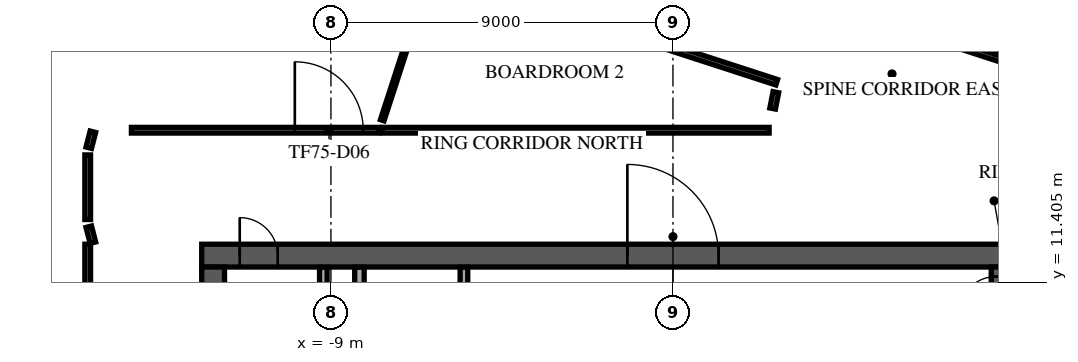
"""IFC4 building model, lengths in metres.
Left out: names, types, materials, properties, quantities, classifications, styles, units other than length and angle.
Written with IfcOpenShell. Run it as: python <this file> out.ifc"""

import sys

from ifc_helpers import new_model, si_unit, direction, frame, frame_2d, origin, place, context, subcontext, project, spatial, rectangle, extrude, element, fill, save


model = new_model("IFC4")
c1 = context("Model", 3, precision=1e-05, world=origin(), true_north=direction((0.0, 1.0)))
c2 = subcontext(c1, "Body", "Model", "MODEL_VIEW")
j1 = project(units=[si_unit("LENGTHUNIT", "METRE"), si_unit("PLANEANGLEUNIT", "RADIAN")], contexts=[c1])
p1 = place(None, origin())
s1 = spatial("IfcSite", under=j1, at=p1, CompositionType="ELEMENT")
p2 = place(p1, origin())
s2 = spatial("IfcBuilding", under=s1, at=p2, CompositionType="ELEMENT")
p3 = place(p2, frame((0.0, 0.0, 316.5)))
s3 = spatial("IfcBuildingStorey", under=s2, at=p3, CompositionType="ELEMENT", Elevation=316.5)
p4 = place(p3, frame((-12.4, 12.1, 0.0), z_axis=(0.0, 0.0, 1.0), x_axis=(1.0, 0.0, 0.0)))
e1 = element("IfcWall", 1, at=p4, inside=s3, PredefinedType="SHEAR", context=c2, shape_type="SweptSolid", body=[
    extrude(rectangle(XDim=24.8, YDim=0.6, at=frame_2d((12.4, 0.0))), origin(), (0.0, 0.0, 1.0), 3.65),
])
p5 = place(p4, frame((11.2, 0.0, 0.0)))
e2 = element("IfcOpeningElement", 2, at=p5, cuts=e1, PredefinedType="OPENING", context=c2, shape_type="SweptSolid", body=[
    extrude(rectangle(XDim=2.4, YDim=2.4, at=frame_2d((1.2, 1.2))), frame((0.0, 0.31, 0.0), z_axis=(0.0, -1.0, 0.0), x_axis=(1.0, 0.0, 0.0)), (0.0, 0.0, 1.0), 0.62),
])
p6 = place(p4, frame((22.025, 0.0, 0.0)))
e3 = element("IfcOpeningElement", 3, at=p6, cuts=e1, PredefinedType="OPENING", context=c2, shape_type="SweptSolid", body=[
    extrude(rectangle(XDim=1.2, YDim=2.1, at=frame_2d((0.6, 1.05))), frame((0.0, 0.31, 0.0), z_axis=(0.0, -1.0, 0.0), x_axis=(1.0, 0.0, 0.0)), (0.0, 0.0, 1.0), 0.62),
])
p7 = place(p4, frame((1.0, 0.0, 0.0)))
e4 = element("IfcOpeningElement", 4, at=p7, cuts=e1, PredefinedType="OPENING", context=c2, shape_type="SweptSolid", body=[
    extrude(rectangle(XDim=1.0, YDim=2.1, at=frame_2d((0.5, 1.05))), frame((0.0, 0.31, 0.0), z_axis=(0.0, -1.0, 0.0), x_axis=(1.0, 0.0, 0.0)), (0.0, 0.0, 1.0), 0.62),
])
p8 = place(p3, frame((-12.1, -11.8, 0.0), z_axis=(0.0, 0.0, 1.0), x_axis=(0.0, 1.0, 0.0)))
e5 = element("IfcWall", 5, at=p8, inside=s3, PredefinedType="SHEAR", context=c2, shape_type="SweptSolid", body=[
    extrude(rectangle(XDim=23.6, YDim=0.6, at=frame_2d((11.8, 0.0))), origin(), (0.0, 0.0, 1.0), 3.65),
])
p9 = place(p8, frame((10.6, 0.0, 0.0)))
e6 = element("IfcOpeningElement", 6, at=p9, cuts=e5, PredefinedType="OPENING", context=c2, shape_type="SweptSolid", body=[
    extrude(rectangle(XDim=2.4, YDim=2.4, at=frame_2d((1.2, 1.2))), frame((0.0, 0.31, 0.0), z_axis=(0.0, -1.0, 0.0), x_axis=(1.0, 0.0, 0.0)), (0.0, 0.0, 1.0), 0.62),
])
p10 = place(p3, frame((8.512, 4.55, 0.0), z_axis=(0.0, 0.0, 1.0), x_axis=(0.0, 1.0, 0.0)))
e7 = element("IfcWall", 7, at=p10, inside=s3, PredefinedType="SOLIDWALL", context=c2, shape_type="SweptSolid", body=[
    extrude(rectangle(XDim=7.25, YDim=0.275, at=frame_2d((3.625, 0.0))), origin(), (0.0, 0.0, 1.0), 3.65),
])
p11 = place(p10, frame((6.0, 0.0, 0.0)))
e8 = element("IfcOpeningElement", 8, at=p11, cuts=e7, PredefinedType="OPENING", context=c2, shape_type="SweptSolid", body=[
    extrude(rectangle(XDim=1.0, YDim=2.1, at=frame_2d((0.5, 1.05))), frame((0.0, 0.147, 0.0), z_axis=(0.0, -1.0, 0.0), x_axis=(1.0, 0.0, 0.0)), (0.0, 0.0, 1.0), 0.295),
])
p12 = place(p3, frame((-9.2, 4.78, 0.0), z_axis=(0.0, 0.0, 1.0), x_axis=(0.0, 1.0, 0.0)))
e9 = element("IfcWall", 9, at=p12, inside=s3, PredefinedType="PARTITIONING", context=c2, shape_type="SweptSolid", body=[
    extrude(rectangle(XDim=7.015, YDim=0.2, at=frame_2d((3.507, 0.0))), origin(), (0.0, 0.0, 1.0), 3.65),
])
p13 = place(p12, frame((2.92, 0.0, 0.0)))
e10 = element("IfcOpeningElement", 10, at=p13, cuts=e9, PredefinedType="OPENING", context=c2, shape_type="SweptSolid", body=[
    extrude(rectangle(XDim=1.0, YDim=2.1, at=frame_2d((0.5, 1.05))), frame((0.0, 0.11, 0.0), z_axis=(0.0, -1.0, 0.0), x_axis=(1.0, 0.0, 0.0)), (0.0, 0.0, 1.0), 0.22),
])
p14 = place(p3, frame((-8.25, 8.805, 0.0), z_axis=(0.0, 0.0, 1.0), x_axis=(0.0, 1.0, 0.0)))
e11 = element("IfcWall", 11, at=p14, inside=s3, PredefinedType="PARTITIONING", context=c2, shape_type="SweptSolid", body=[
    extrude(rectangle(XDim=2.99, YDim=0.25, at=frame_2d((1.495, 0.0))), origin(), (0.0, 0.0, 1.0), 3.65),
])
p15 = place(p14, frame((0.895, 0.0, 0.0)))
e12 = element("IfcOpeningElement", 12, at=p15, cuts=e11, PredefinedType="OPENING", context=c2, shape_type="SweptSolid", body=[
    extrude(rectangle(XDim=1.0, YDim=2.1, at=frame_2d((0.5, 1.05))), frame((0.0, 0.135, 0.0), z_axis=(0.0, -1.0, 0.0), x_axis=(1.0, 0.0, 0.0)), (0.0, 0.0, 1.0), 0.27),
])
p16 = place(p3, frame((-5.5, 8.805, 0.0), z_axis=(0.0, 0.0, 1.0), x_axis=(0.0, 1.0, 0.0)))
e13 = element("IfcWall", 13, at=p16, inside=s3, PredefinedType="PARTITIONING", context=c2, shape_type="SweptSolid", body=[
    extrude(rectangle(XDim=2.99, YDim=0.2, at=frame_2d((1.495, 0.0))), origin(), (0.0, 0.0, 1.0), 3.65),
])
p17 = place(p16, frame((0.532, 0.0, 0.0)))
e14 = element("IfcOpeningElement", 14, at=p17, cuts=e13, PredefinedType="OPENING", context=c2, shape_type="SweptSolid", body=[
    extrude(rectangle(XDim=1.8, YDim=2.1, at=frame_2d((0.9, 1.05))), frame((0.0, 0.11, 0.0), z_axis=(0.0, -1.0, 0.0), x_axis=(1.0, 0.0, 0.0)), (0.0, 0.0, 1.0), 0.22),
])
p18 = place(p3, frame((-15.4, -12.4, 0.0), z_axis=(0.0, 0.0, 1.0), x_axis=(0.0, 1.0, 0.0)))
e15 = element("IfcWall", 15, at=p18, inside=s3, PredefinedType="PARTITIONING", context=c2, shape_type="SweptSolid", body=[
    extrude(rectangle(XDim=24.8, YDim=0.15, at=frame_2d((12.4, 0.0))), origin(), (0.0, 0.0, 1.0), 3.25),
])
p19 = place(p18, frame((1.05, 0.0, 0.0)))
e16 = element("IfcOpeningElement", 16, at=p19, cuts=e15, PredefinedType="OPENING", context=c2, shape_type="SweptSolid", body=[
    extrude(rectangle(XDim=1.0, YDim=2.1, at=frame_2d((0.5, 1.05))), frame((0.0, 0.085, 0.0), z_axis=(0.0, -1.0, 0.0), x_axis=(1.0, 0.0, 0.0)), (0.0, 0.0, 1.0), 0.17),
])
p20 = place(p18, frame((9.767, 0.0, 0.0)))
e17 = element("IfcOpeningElement", 17, at=p20, cuts=e15, PredefinedType="OPENING", context=c2, shape_type="SweptSolid", body=[
    extrude(rectangle(XDim=1.0, YDim=2.1, at=frame_2d((0.5, 1.05))), frame((0.0, 0.085, 0.0), z_axis=(0.0, -1.0, 0.0), x_axis=(1.0, 0.0, 0.0)), (0.0, 0.0, 1.0), 0.17),
])
p21 = place(p18, frame((16.733, 0.0, 0.0)))
e18 = element("IfcOpeningElement", 18, at=p21, cuts=e15, PredefinedType="OPENING", context=c2, shape_type="SweptSolid", body=[
    extrude(rectangle(XDim=1.0, YDim=2.1, at=frame_2d((0.5, 1.05))), frame((0.0, 0.085, 0.0), z_axis=(0.0, -1.0, 0.0), x_axis=(1.0, 0.0, 0.0)), (0.0, 0.0, 1.0), 0.17),
])
p22 = place(p3, frame((-15.4, 13.05, 0.0), z_axis=(0.0, 0.0, 1.0), x_axis=(0.0, 1.0, 0.0)))
e19 = element("IfcWall", 19, at=p22, inside=s3, PredefinedType="PARTITIONING", context=c2, shape_type="SweptSolid", body=[
    extrude(rectangle(XDim=1.7, YDim=0.15, at=frame_2d((0.85, 0.0))), origin(), (0.0, 0.0, 1.0), 3.25),
])
p23 = place(p3, frame((-15.263, 12.44, 0.0), z_axis=(0.0, 0.0, 1.0), x_axis=(-0.249928977064, 0.968264171817, 0.0)))
e20 = element("IfcWall", 20, at=p23, inside=s3, PredefinedType="PARTITIONING", context=c2, shape_type="SweptSolid", body=[
    extrude(rectangle(XDim=0.435, YDim=0.15, at=frame_2d((0.217, 0.0))), origin(), (0.0, 0.0, 1.0), 3.25),
])
p24 = place(p3, frame((-15.263, 15.36, 0.0), z_axis=(0.0, 0.0, 1.0), x_axis=(-0.250064963452, -0.968229060736, 0.0)))
e21 = element("IfcWall", 21, at=p24, inside=s3, PredefinedType="PARTITIONING", context=c2, shape_type="SweptSolid", body=[
    extrude(rectangle(XDim=0.435, YDim=0.15, at=frame_2d((0.217, 0.0))), origin(), (0.0, 0.0, 1.0), 3.25),
])
p25 = place(p3, frame((-14.25, 15.4, 0.0), z_axis=(0.0, 0.0, 1.0), x_axis=(1.0, 0.0, 0.0)))
e22 = element("IfcWall", 22, at=p25, inside=s3, PredefinedType="PARTITIONING", context=c2, shape_type="SweptSolid", body=[
    extrude(rectangle(XDim=6.515, YDim=0.15, at=frame_2d((3.258, 0.0))), origin(), (0.0, 0.0, 1.0), 3.25),
])
p26 = place(p25, frame((4.3, 0.0, 0.0)))
e23 = element("IfcOpeningElement", 23, at=p26, cuts=e22, PredefinedType="OPENING", context=c2, shape_type="SweptSolid", body=[
    extrude(rectangle(XDim=1.8, YDim=2.1, at=frame_2d((0.9, 1.05))), frame((0.0, 0.085, 0.0), z_axis=(0.0, -1.0, 0.0), x_axis=(1.0, 0.0, 0.0)), (0.0, 0.0, 1.0), 0.17),
])
p27 = place(p3, frame((-11.706, 21.352, 0.0), z_axis=(0.0, 0.0, 1.0), x_axis=(0.951071532065, -0.308970776767, 0.0)))
e24 = element("IfcWall", 24, at=p27, inside=s3, PredefinedType="PARTITIONING", context=c2, shape_type="SweptSolid", body=[
    extrude(rectangle(XDim=15.178, YDim=0.15, at=frame_2d((7.589, 0.0))), origin(), (0.0, 0.0, 1.0), 3.25),
])
p28 = place(p27, frame((3.55, 0.0, 0.0)))
e25 = element("IfcOpeningElement", 25, at=p28, cuts=e24, PredefinedType="OPENING", context=c2, shape_type="SweptSolid", body=[
    extrude(rectangle(XDim=1.0, YDim=2.1, at=frame_2d((0.5, 1.05))), frame((0.0, 0.085, 0.0), z_axis=(0.0, -1.0, 0.0), x_axis=(1.0, 0.0, 0.0)), (0.0, 0.0, 1.0), 0.17),
])
p29 = place(p27, frame((7.665, 0.0, 0.0)))
e26 = element("IfcOpeningElement", 26, at=p29, cuts=e24, PredefinedType="OPENING", context=c2, shape_type="SweptSolid", body=[
    extrude(rectangle(XDim=1.0, YDim=2.1, at=frame_2d((0.5, 1.05))), frame((0.0, 0.085, 0.0), z_axis=(0.0, -1.0, 0.0), x_axis=(1.0, 0.0, 0.0)), (0.0, 0.0, 1.0), 0.17),
])
p30 = place(p3, frame((-10.964, 23.635, 0.0), z_axis=(0.0, 0.0, 1.0), x_axis=(0.951055018443, -0.309021604252, 0.0)))
e27 = element("IfcWall", 27, at=p30, inside=s3, PredefinedType="PARTITIONING", context=c2, shape_type="SweptSolid", body=[
    extrude(rectangle(XDim=35.537, YDim=0.15, at=frame_2d((17.769, 0.0))), origin(), (0.0, 0.0, 1.0), 3.25),
])
p31 = place(p30, frame((9.554, 0.0, 0.0)))
e28 = element("IfcOpeningElement", 28, at=p31, cuts=e27, PredefinedType="OPENING", context=c2, shape_type="SweptSolid", body=[
    extrude(rectangle(XDim=1.0, YDim=2.1, at=frame_2d((0.5, 1.05))), frame((0.0, 0.085, 0.0), z_axis=(0.0, -1.0, 0.0), x_axis=(1.0, 0.0, 0.0)), (0.0, 0.0, 1.0), 0.17),
])
p32 = place(p30, frame((14.629, 0.0, 0.0)))
e29 = element("IfcOpeningElement", 29, at=p32, cuts=e27, PredefinedType="OPENING", context=c2, shape_type="SweptSolid", body=[
    extrude(rectangle(XDim=1.0, YDim=2.1, at=frame_2d((0.5, 1.05))), frame((0.0, 0.085, 0.0), z_axis=(0.0, -1.0, 0.0), x_axis=(1.0, 0.0, 0.0)), (0.0, 0.0, 1.0), 0.17),
])
p33 = place(p30, frame((27.287, 0.0, 0.0)))
e30 = element("IfcOpeningElement", 30, at=p33, cuts=e27, PredefinedType="OPENING", context=c2, shape_type="SweptSolid", body=[
    extrude(rectangle(XDim=1.0, YDim=2.1, at=frame_2d((0.5, 1.05))), frame((0.0, 0.085, 0.0), z_axis=(0.0, -1.0, 0.0), x_axis=(1.0, 0.0, 0.0)), (0.0, 0.0, 1.0), 0.17),
])
p34 = place(p30, frame((29.988, 0.0, 0.0)))
e31 = element("IfcOpeningElement", 31, at=p34, cuts=e27, PredefinedType="OPENING", context=c2, shape_type="SweptSolid", body=[
    extrude(rectangle(XDim=1.8, YDim=2.1, at=frame_2d((0.9, 1.05))), frame((0.0, 0.085, 0.0), z_axis=(0.0, -1.0, 0.0), x_axis=(1.0, 0.0, 0.0)), (0.0, 0.0, 1.0), 0.17),
])
p35 = place(p3, frame((-7.65, 15.4, 0.0), z_axis=(0.0, 0.0, 1.0), x_axis=(1.0, 0.0, 0.0)))
e32 = element("IfcWall", 32, at=p35, inside=s3, PredefinedType="PARTITIONING", context=c2, shape_type="SweptSolid", body=[
    extrude(rectangle(XDim=10.18, YDim=0.15, at=frame_2d((5.09, 0.0))), origin(), (0.0, 0.0, 1.0), 3.25),
])
p36 = place(p3, frame((2.708, 16.4, 0.0), z_axis=(0.0, 0.0, 1.0), x_axis=(-0.193004252624, -0.981197920131, 0.0)))
e33 = element("IfcWall", 33, at=p36, inside=s3, PredefinedType="PARTITIONING", context=c2, shape_type="SweptSolid", body=[
    extrude(rectangle(XDim=0.438, YDim=0.15, at=frame_2d((0.219, 0.0))), origin(), (0.0, 0.0, 1.0), 3.25),
])
p37 = place(p3, frame((-7.65, 15.662, 0.0), z_axis=(0.0, 0.0, 1.0), x_axis=(0.308990083735, 0.951065259671, 0.0)))
e34 = element("IfcWall", 34, at=p37, inside=s3, PredefinedType="PARTITIONING", context=c2, shape_type="SweptSolid", body=[
    extrude(rectangle(XDim=4.083, YDim=0.1, at=frame_2d((2.042, 0.0))), origin(), (0.0, 0.0, 1.0), 3.25),
])
p38 = place(p3, frame((8.543, 17.379, 0.0), z_axis=(0.0, 0.0, 1.0), x_axis=(0.251516032517, 0.967853132137, 0.0)))
e35 = element("IfcWall", 35, at=p38, inside=s3, PredefinedType="PARTITIONING", context=c2, shape_type="SweptSolid", body=[
    extrude(rectangle(XDim=10.248, YDim=0.1, at=frame_2d((5.124, 0.0))), origin(), (0.0, 0.0, 1.0), 3.05),
])
p39 = place(p5, origin())
e36 = element("IfcDoor", 36, at=p39, inside=s3, OperationType="SINGLE_SWING_LEFT", PredefinedType="DOOR", context=c2, shape_type="SweptSolid", body=[
    extrude(rectangle(XDim=2.4, YDim=2.4, at=frame_2d((1.2, 1.2))), frame((0.0, 0.025, 0.0), z_axis=(0.0, -1.0, 0.0), x_axis=(1.0, 0.0, 0.0)), (0.0, 0.0, 1.0), 0.05),
])
fill(e2, e36)
p40 = place(p7, origin())
e37 = element("IfcDoor", 37, at=p40, inside=s3, OperationType="SINGLE_SWING_LEFT", PredefinedType="DOOR", context=c2, shape_type="SweptSolid", body=[
    extrude(rectangle(XDim=1.0, YDim=2.1, at=frame_2d((0.5, 1.05))), frame((0.0, 0.025, 0.0), z_axis=(0.0, -1.0, 0.0), x_axis=(1.0, 0.0, 0.0)), (0.0, 0.0, 1.0), 0.05),
])
fill(e4, e37)
p41 = place(p11, origin())
e38 = element("IfcDoor", 38, at=p41, inside=s3, OperationType="SINGLE_SWING_LEFT", PredefinedType="DOOR", context=c2, shape_type="SweptSolid", body=[
    extrude(rectangle(XDim=1.0, YDim=2.1, at=frame_2d((0.5, 1.05))), frame((0.0, 0.025, 0.0), z_axis=(0.0, -1.0, 0.0), x_axis=(1.0, 0.0, 0.0)), (0.0, 0.0, 1.0), 0.05),
])
fill(e8, e38)
p42 = place(p26, origin())
e39 = element("IfcDoor", 39, at=p42, inside=s3, OperationType="DOUBLE_DOOR_SINGLE_SWING", PredefinedType="DOOR", context=c2, shape_type="SweptSolid", body=[
    extrude(rectangle(XDim=1.8, YDim=2.1, at=frame_2d((0.9, 1.05))), frame((0.0, 0.025, 0.0), z_axis=(0.0, -1.0, 0.0), x_axis=(1.0, 0.0, 0.0)), (0.0, 0.0, 1.0), 0.05),
])
fill(e23, e39)
save(model, sys.argv[1])
